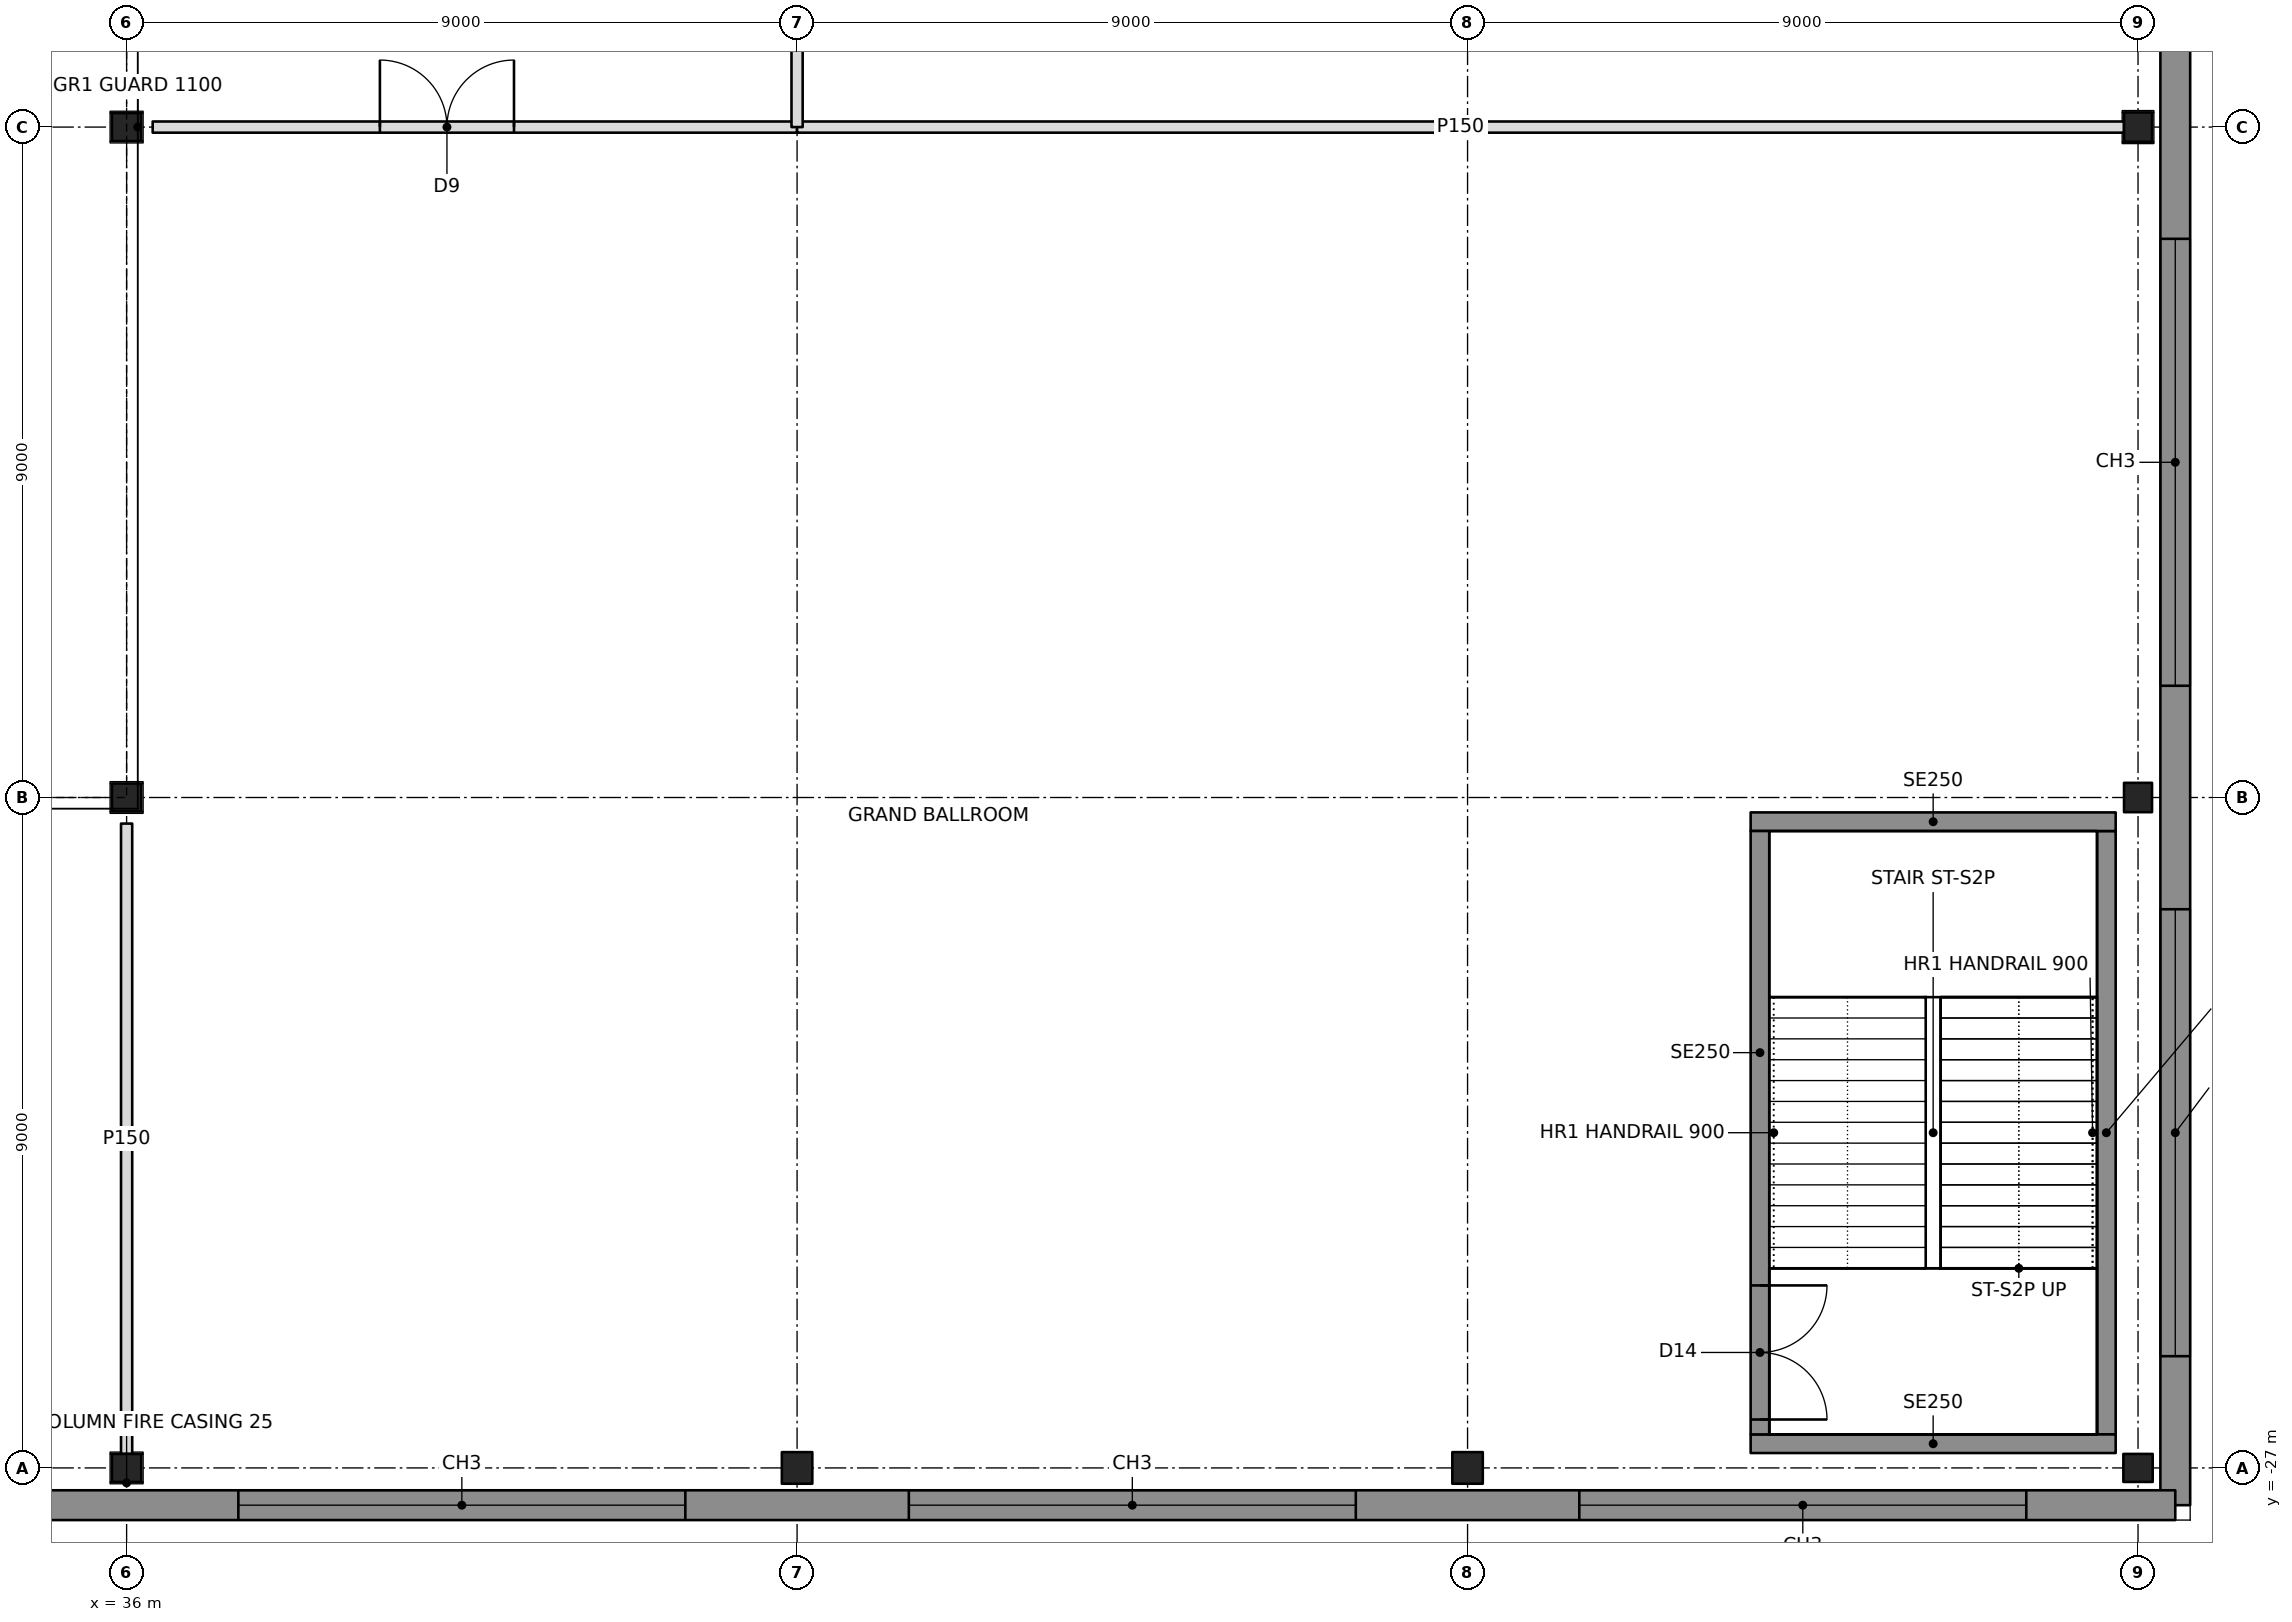
"""IFC4 building model, lengths in metres.
Left out: names, types, materials, properties, quantities, classifications, styles, units other than length and angle.
Written with IfcOpenShell. Run it as: python <this file> out.ifc"""

import sys

from ifc_helpers import new_model, si_unit, direction, frame, frame_2d, origin, origin_2d, place, context, subcontext, project, spatial, rectangle, i_section, extrude, element, fill, save


model = new_model("IFC4")
c1 = context("Model", 3, precision=1e-05, world=origin(), true_north=direction((0.0, 1.0)))
c2 = subcontext(c1, "Body", "Model", "MODEL_VIEW")
j1 = project(units=[si_unit("LENGTHUNIT", "METRE"), si_unit("PLANEANGLEUNIT", "RADIAN")], contexts=[c1])
p1 = place(None, origin())
s1 = spatial("IfcSite", under=j1, at=p1, CompositionType="ELEMENT")
p2 = place(p1, origin())
s2 = spatial("IfcBuilding", under=s1, at=p2, CompositionType="ELEMENT")
p3 = place(p2, frame((0.0, 0.0, 16.0)))
s3 = spatial("IfcBuildingStorey", under=s2, at=p3, CompositionType="ELEMENT", Elevation=16.0)
for number, where, z_axis, x_axis in (
    (1, (36.0, -27.0, 0.0), (0.0, 0.0, 1.0), (1.0, 0.0, 0.0)),
    (2, (36.0, -18.0, 0.0), (0.0, 0.0, 1.0), (1.0, 0.0, 0.0)),
    (3, (36.0, -9.0, 0.0), (0.0, 0.0, 1.0), (1.0, 0.0, 0.0)),
):
    element("IfcColumn", number, at=place(p3, frame(where, z_axis=z_axis, x_axis=x_axis)), inside=s3, PredefinedType="COLUMN", context=c2, shape_type="SweptSolid", body=[
        extrude(i_section(OverallWidth=0.394, OverallDepth=0.376, WebThickness=0.017, FlangeThickness=0.028, at=origin_2d()), origin(), (0.0, 0.0, 1.0), 7.0),
    ])
for number, where, z_axis, x_axis in (
    (4, (45.0, -27.0, 0.0), (0.0, 0.0, 1.0), (1.0, 0.0, 0.0)),
    (5, (54.0, -27.0, 0.0), (0.0, 0.0, 1.0), (1.0, 0.0, 0.0)),
):
    element("IfcColumn", number, at=place(p3, frame(where, z_axis=z_axis, x_axis=x_axis)), inside=s3, PredefinedType="COLUMN", context=c2, shape_type="SweptSolid", body=[
        extrude(i_section(OverallWidth=0.409, OverallDepth=0.424, WebThickness=0.033, FlangeThickness=0.052, at=origin_2d()), origin(), (0.0, 0.0, 1.0), 7.0),
    ])
for number, where, z_axis, x_axis in (
    (6, (63.0, -27.0, 0.0), (0.0, 0.0, 1.0), (1.0, 0.0, 0.0)),
    (7, (63.0, -18.0, 0.0), (0.0, 0.0, 1.0), (0.0, 1.0, 0.0)),
    (8, (63.0, -9.0, 0.0), (0.0, 0.0, 1.0), (0.0, 1.0, 0.0)),
):
    element("IfcColumn", number, at=place(p3, frame(where, z_axis=z_axis, x_axis=x_axis)), inside=s3, PredefinedType="COLUMN", context=c2, shape_type="SweptSolid", body=[
        extrude(i_section(OverallWidth=0.394, OverallDepth=0.376, WebThickness=0.017, FlangeThickness=0.028, at=origin_2d()), origin(), (0.0, 0.0, 1.0), 7.0),
    ])
p4 = place(p3, frame((-9.5, -27.5, 0.0), z_axis=(0.0, 0.0, 1.0), x_axis=(1.0, 0.0, 0.0)))
e9 = element("IfcWall", 9, at=p4, inside=s3, PredefinedType="SOLIDWALL", context=c2, shape_type="SweptSolid", body=[
    extrude(rectangle(XDim=73.0, YDim=0.4, at=frame_2d((36.5, 0.0))), origin(), (0.0, 0.0, 1.0), 6.7),
])
p5 = place(p4, frame((2.0, 0.0, 0.9)))
e10 = element("IfcOpeningElement", 10, at=p5, cuts=e9, PredefinedType="OPENING", context=c2, shape_type="SweptSolid", body=[
    extrude(rectangle(XDim=6.0, YDim=2.6, at=frame_2d((3.0, 1.3))), frame((0.0, 0.21, 0.0), z_axis=(0.0, -1.0, 0.0), x_axis=(1.0, 0.0, 0.0)), (0.0, 0.0, 1.0), 0.42),
])
p6 = place(p4, frame((11.0, 0.0, 0.9)))
e11 = element("IfcOpeningElement", 11, at=p6, cuts=e9, PredefinedType="OPENING", context=c2, shape_type="SweptSolid", body=[
    extrude(rectangle(XDim=6.0, YDim=2.6, at=frame_2d((3.0, 1.3))), frame((0.0, 0.21, 0.0), z_axis=(0.0, -1.0, 0.0), x_axis=(1.0, 0.0, 0.0)), (0.0, 0.0, 1.0), 0.42),
])
p7 = place(p4, frame((20.0, 0.0, 0.9)))
e12 = element("IfcOpeningElement", 12, at=p7, cuts=e9, PredefinedType="OPENING", context=c2, shape_type="SweptSolid", body=[
    extrude(rectangle(XDim=6.0, YDim=2.6, at=frame_2d((3.0, 1.3))), frame((0.0, 0.21, 0.0), z_axis=(0.0, -1.0, 0.0), x_axis=(1.0, 0.0, 0.0)), (0.0, 0.0, 1.0), 0.42),
])
p8 = place(p4, frame((29.0, 0.0, 0.9)))
e13 = element("IfcOpeningElement", 13, at=p8, cuts=e9, PredefinedType="OPENING", context=c2, shape_type="SweptSolid", body=[
    extrude(rectangle(XDim=6.0, YDim=2.6, at=frame_2d((3.0, 1.3))), frame((0.0, 0.21, 0.0), z_axis=(0.0, -1.0, 0.0), x_axis=(1.0, 0.0, 0.0)), (0.0, 0.0, 1.0), 0.42),
])
p9 = place(p4, frame((38.0, 0.0, 0.9)))
e14 = element("IfcOpeningElement", 14, at=p9, cuts=e9, PredefinedType="OPENING", context=c2, shape_type="SweptSolid", body=[
    extrude(rectangle(XDim=6.0, YDim=2.6, at=frame_2d((3.0, 1.3))), frame((0.0, 0.21, 0.0), z_axis=(0.0, -1.0, 0.0), x_axis=(1.0, 0.0, 0.0)), (0.0, 0.0, 1.0), 0.42),
])
p10 = place(p4, frame((47.0, 0.0, 0.9)))
e15 = element("IfcOpeningElement", 15, at=p10, cuts=e9, PredefinedType="OPENING", context=c2, shape_type="SweptSolid", body=[
    extrude(rectangle(XDim=6.0, YDim=2.6, at=frame_2d((3.0, 1.3))), frame((0.0, 0.21, 0.0), z_axis=(0.0, -1.0, 0.0), x_axis=(1.0, 0.0, 0.0)), (0.0, 0.0, 1.0), 0.42),
])
p11 = place(p4, frame((56.0, 0.0, 0.9)))
e16 = element("IfcOpeningElement", 16, at=p11, cuts=e9, PredefinedType="OPENING", context=c2, shape_type="SweptSolid", body=[
    extrude(rectangle(XDim=6.0, YDim=2.6, at=frame_2d((3.0, 1.3))), frame((0.0, 0.21, 0.0), z_axis=(0.0, -1.0, 0.0), x_axis=(1.0, 0.0, 0.0)), (0.0, 0.0, 1.0), 0.42),
])
p12 = place(p4, frame((65.0, 0.0, 0.9)))
e17 = element("IfcOpeningElement", 17, at=p12, cuts=e9, PredefinedType="OPENING", context=c2, shape_type="SweptSolid", body=[
    extrude(rectangle(XDim=6.0, YDim=2.6, at=frame_2d((3.0, 1.3))), frame((0.0, 0.21, 0.0), z_axis=(0.0, -1.0, 0.0), x_axis=(1.0, 0.0, 0.0)), (0.0, 0.0, 1.0), 0.42),
])
p13 = place(p3, frame((63.5, -27.5, 0.0), z_axis=(0.0, 0.0, 1.0), x_axis=(0.0, 1.0, 0.0)))
e18 = element("IfcWall", 18, at=p13, inside=s3, PredefinedType="SOLIDWALL", context=c2, shape_type="SweptSolid", body=[
    extrude(rectangle(XDim=73.0, YDim=0.4, at=frame_2d((36.5, 0.0))), origin(), (0.0, 0.0, 1.0), 6.7),
])
p14 = place(p13, frame((2.0, 0.0, 0.9)))
e19 = element("IfcOpeningElement", 19, at=p14, cuts=e18, PredefinedType="OPENING", context=c2, shape_type="SweptSolid", body=[
    extrude(rectangle(XDim=6.0, YDim=2.6, at=frame_2d((3.0, 1.3))), frame((0.0, 0.21, 0.0), z_axis=(0.0, -1.0, 0.0), x_axis=(1.0, 0.0, 0.0)), (0.0, 0.0, 1.0), 0.42),
])
p15 = place(p13, frame((11.0, 0.0, 0.9)))
e20 = element("IfcOpeningElement", 20, at=p15, cuts=e18, PredefinedType="OPENING", context=c2, shape_type="SweptSolid", body=[
    extrude(rectangle(XDim=6.0, YDim=2.6, at=frame_2d((3.0, 1.3))), frame((0.0, 0.21, 0.0), z_axis=(0.0, -1.0, 0.0), x_axis=(1.0, 0.0, 0.0)), (0.0, 0.0, 1.0), 0.42),
])
p16 = place(p13, frame((20.0, 0.0, 0.9)))
e21 = element("IfcOpeningElement", 21, at=p16, cuts=e18, PredefinedType="OPENING", context=c2, shape_type="SweptSolid", body=[
    extrude(rectangle(XDim=6.0, YDim=2.6, at=frame_2d((3.0, 1.3))), frame((0.0, 0.21, 0.0), z_axis=(0.0, -1.0, 0.0), x_axis=(1.0, 0.0, 0.0)), (0.0, 0.0, 1.0), 0.42),
])
p17 = place(p13, frame((29.0, 0.0, 0.9)))
e22 = element("IfcOpeningElement", 22, at=p17, cuts=e18, PredefinedType="OPENING", context=c2, shape_type="SweptSolid", body=[
    extrude(rectangle(XDim=6.0, YDim=2.6, at=frame_2d((3.0, 1.3))), frame((0.0, 0.21, 0.0), z_axis=(0.0, -1.0, 0.0), x_axis=(1.0, 0.0, 0.0)), (0.0, 0.0, 1.0), 0.42),
])
p18 = place(p13, frame((38.0, 0.0, 0.9)))
e23 = element("IfcOpeningElement", 23, at=p18, cuts=e18, PredefinedType="OPENING", context=c2, shape_type="SweptSolid", body=[
    extrude(rectangle(XDim=6.0, YDim=2.6, at=frame_2d((3.0, 1.3))), frame((0.0, 0.21, 0.0), z_axis=(0.0, -1.0, 0.0), x_axis=(1.0, 0.0, 0.0)), (0.0, 0.0, 1.0), 0.42),
])
p19 = place(p13, frame((47.0, 0.0, 0.9)))
e24 = element("IfcOpeningElement", 24, at=p19, cuts=e18, PredefinedType="OPENING", context=c2, shape_type="SweptSolid", body=[
    extrude(rectangle(XDim=6.0, YDim=2.6, at=frame_2d((3.0, 1.3))), frame((0.0, 0.21, 0.0), z_axis=(0.0, -1.0, 0.0), x_axis=(1.0, 0.0, 0.0)), (0.0, 0.0, 1.0), 0.42),
])
p20 = place(p13, frame((56.0, 0.0, 0.9)))
e25 = element("IfcOpeningElement", 25, at=p20, cuts=e18, PredefinedType="OPENING", context=c2, shape_type="SweptSolid", body=[
    extrude(rectangle(XDim=6.0, YDim=2.6, at=frame_2d((3.0, 1.3))), frame((0.0, 0.21, 0.0), z_axis=(0.0, -1.0, 0.0), x_axis=(1.0, 0.0, 0.0)), (0.0, 0.0, 1.0), 0.42),
])
p21 = place(p13, frame((65.0, 0.0, 0.9)))
e26 = element("IfcOpeningElement", 26, at=p21, cuts=e18, PredefinedType="OPENING", context=c2, shape_type="SweptSolid", body=[
    extrude(rectangle(XDim=6.0, YDim=2.6, at=frame_2d((3.0, 1.3))), frame((0.0, 0.21, 0.0), z_axis=(0.0, -1.0, 0.0), x_axis=(1.0, 0.0, 0.0)), (0.0, 0.0, 1.0), 0.42),
])
p22 = place(p3, frame((36.0, -26.812, 0.0), z_axis=(0.0, 0.0, 1.0), x_axis=(0.0, 1.0, 0.0)))
e27 = element("IfcWall", 27, at=p22, inside=s3, PredefinedType="PARTITIONING", context=c2, shape_type="SweptSolid", body=[
    extrude(rectangle(XDim=8.462, YDim=0.15, at=frame_2d((4.231, 0.0))), origin(), (0.0, 0.0, 1.0), 5.753),
])
p23 = place(p3, frame((36.35, -9.0, 0.0), z_axis=(0.0, 0.0, 1.0), x_axis=(1.0, 0.0, 0.0)))
e28 = element("IfcWall", 28, at=p23, inside=s3, PredefinedType="PARTITIONING", context=c2, shape_type="SweptSolid", body=[
    extrude(rectangle(XDim=8.65, YDim=0.15, at=frame_2d((4.325, 0.0))), origin(), (0.0, 0.0, 1.0), 5.52),
])
p24 = place(p23, frame((3.05, 0.0, 0.0)))
e29 = element("IfcOpeningElement", 29, at=p24, cuts=e28, PredefinedType="OPENING", context=c2, shape_type="SweptSolid", body=[
    extrude(rectangle(XDim=1.8, YDim=2.4, at=frame_2d((0.9, 1.2))), frame((0.0, 0.085, 0.0), z_axis=(0.0, -1.0, 0.0), x_axis=(1.0, 0.0, 0.0)), (0.0, 0.0, 1.0), 0.17),
])
p25 = place(p3, frame((45.0, -9.0, 0.0), z_axis=(0.0, 0.0, 1.0), x_axis=(1.0, 0.0, 0.0)))
e30 = element("IfcWall", 30, at=p25, inside=s3, PredefinedType="PARTITIONING", context=c2, shape_type="SweptSolid", body=[
    extrude(rectangle(XDim=17.812, YDim=0.15, at=frame_2d((8.906, 0.0))), origin(), (0.0, 0.0, 1.0), 5.52),
])
p26 = place(p3, frame((45.0, -9.0, 0.0), z_axis=(0.0, 0.0, 1.0), x_axis=(0.0, 1.0, 0.0)))
e31 = element("IfcWall", 31, at=p26, inside=s3, PredefinedType="PARTITIONING", context=c2, shape_type="SweptSolid", body=[
    extrude(rectangle(XDim=8.6, YDim=0.15, at=frame_2d((4.3, 0.0))), origin(), (0.0, 0.0, 1.0), 5.52),
])
for number, where, z_axis, x_axis in (
    (32, (57.8, -26.675, 0.0), (0.0, 0.0, 1.0), (1.0, 0.0, 0.0)),
    (33, (57.8, -18.325, 0.0), (0.0, 0.0, 1.0), (1.0, 0.0, 0.0)),
):
    element("IfcWall", number, at=place(p3, frame(where, z_axis=z_axis, x_axis=x_axis)), inside=s3, PredefinedType="SOLIDWALL", context=c2, shape_type="SweptSolid", body=[
        extrude(rectangle(XDim=4.9, YDim=0.25, at=frame_2d((2.45, 0.0))), origin(), (0.0, 0.0, 1.0), 6.7),
    ])
p27 = place(p3, frame((57.925, -26.55, 0.0), z_axis=(0.0, 0.0, 1.0), x_axis=(0.0, 1.0, 0.0)))
e34 = element("IfcWall", 34, at=p27, inside=s3, PredefinedType="SOLIDWALL", context=c2, shape_type="SweptSolid", body=[
    extrude(rectangle(XDim=8.1, YDim=0.25, at=frame_2d((4.05, 0.0))), origin(), (0.0, 0.0, 1.0), 6.7),
])
p28 = place(p27, frame((0.2, 0.0, 0.0)))
e35 = element("IfcOpeningElement", 35, at=p28, cuts=e34, PredefinedType="OPENING", context=c2, shape_type="SweptSolid", body=[
    extrude(rectangle(XDim=1.8, YDim=2.1, at=frame_2d((0.9, 1.05))), frame((0.0, 0.135, 0.0), z_axis=(0.0, -1.0, 0.0), x_axis=(1.0, 0.0, 0.0)), (0.0, 0.0, 1.0), 0.27),
])
p29 = place(p3, frame((62.575, -26.55, 0.0), z_axis=(0.0, 0.0, 1.0), x_axis=(0.0, 1.0, 0.0)))
e36 = element("IfcWall", 36, at=p29, inside=s3, PredefinedType="SOLIDWALL", context=c2, shape_type="SweptSolid", body=[
    extrude(rectangle(XDim=8.1, YDim=0.25, at=frame_2d((4.05, 0.0))), origin(), (0.0, 0.0, 1.0), 6.7),
])
p30 = place(p10, origin())
e37 = element("IfcWindow", 37, at=p30, inside=s3, PartitioningType="TRIPLE_PANEL_VERTICAL", PredefinedType="WINDOW", context=c2, shape_type="SweptSolid", body=[
    extrude(rectangle(XDim=6.0, YDim=2.6, at=frame_2d((3.0, 1.3))), frame((0.0, 0.03, 0.0), z_axis=(0.0, -1.0, 0.0), x_axis=(1.0, 0.0, 0.0)), (0.0, 0.0, 1.0), 0.06),
])
fill(e15, e37)
p31 = place(p11, origin())
e38 = element("IfcWindow", 38, at=p31, inside=s3, PartitioningType="TRIPLE_PANEL_VERTICAL", PredefinedType="WINDOW", context=c2, shape_type="SweptSolid", body=[
    extrude(rectangle(XDim=6.0, YDim=2.6, at=frame_2d((3.0, 1.3))), frame((0.0, 0.03, 0.0), z_axis=(0.0, -1.0, 0.0), x_axis=(1.0, 0.0, 0.0)), (0.0, 0.0, 1.0), 0.06),
])
fill(e16, e38)
p32 = place(p12, origin())
e39 = element("IfcWindow", 39, at=p32, inside=s3, PartitioningType="TRIPLE_PANEL_VERTICAL", PredefinedType="WINDOW", context=c2, shape_type="SweptSolid", body=[
    extrude(rectangle(XDim=6.0, YDim=2.6, at=frame_2d((3.0, 1.3))), frame((0.0, 0.03, 0.0), z_axis=(0.0, -1.0, 0.0), x_axis=(1.0, 0.0, 0.0)), (0.0, 0.0, 1.0), 0.06),
])
fill(e17, e39)
p33 = place(p14, origin())
e40 = element("IfcWindow", 40, at=p33, inside=s3, PartitioningType="TRIPLE_PANEL_VERTICAL", PredefinedType="WINDOW", context=c2, shape_type="SweptSolid", body=[
    extrude(rectangle(XDim=6.0, YDim=2.6, at=frame_2d((3.0, 1.3))), frame((0.0, 0.03, 0.0), z_axis=(0.0, -1.0, 0.0), x_axis=(1.0, 0.0, 0.0)), (0.0, 0.0, 1.0), 0.06),
])
fill(e19, e40)
p34 = place(p15, origin())
e41 = element("IfcWindow", 41, at=p34, inside=s3, PartitioningType="TRIPLE_PANEL_VERTICAL", PredefinedType="WINDOW", context=c2, shape_type="SweptSolid", body=[
    extrude(rectangle(XDim=6.0, YDim=2.6, at=frame_2d((3.0, 1.3))), frame((0.0, 0.03, 0.0), z_axis=(0.0, -1.0, 0.0), x_axis=(1.0, 0.0, 0.0)), (0.0, 0.0, 1.0), 0.06),
])
fill(e20, e41)
p35 = place(p24, origin())
e42 = element("IfcDoor", 42, at=p35, inside=s3, OperationType="DOUBLE_DOOR_SINGLE_SWING", PredefinedType="DOOR", context=c2, shape_type="SweptSolid", body=[
    extrude(rectangle(XDim=1.8, YDim=2.4, at=frame_2d((0.9, 1.2))), frame((0.0, 0.025, 0.0), z_axis=(0.0, -1.0, 0.0), x_axis=(1.0, 0.0, 0.0)), (0.0, 0.0, 1.0), 0.05),
])
fill(e29, e42)
p36 = place(p28, frame((1.8, 0.0, 0.0), z_axis=(0.0, 0.0, 1.0), x_axis=(-1.0, 0.0, 0.0)))
e43 = element("IfcDoor", 43, at=p36, inside=s3, OperationType="DOUBLE_DOOR_SINGLE_SWING", PredefinedType="DOOR", context=c2, shape_type="SweptSolid", body=[
    extrude(rectangle(XDim=1.8, YDim=2.1, at=frame_2d((0.9, 1.05))), frame((0.0, 0.025, 0.0), z_axis=(0.0, -1.0, 0.0), x_axis=(1.0, 0.0, 0.0)), (0.0, 0.0, 1.0), 0.05),
])
fill(e35, e43)
save(model, sys.argv[1])
